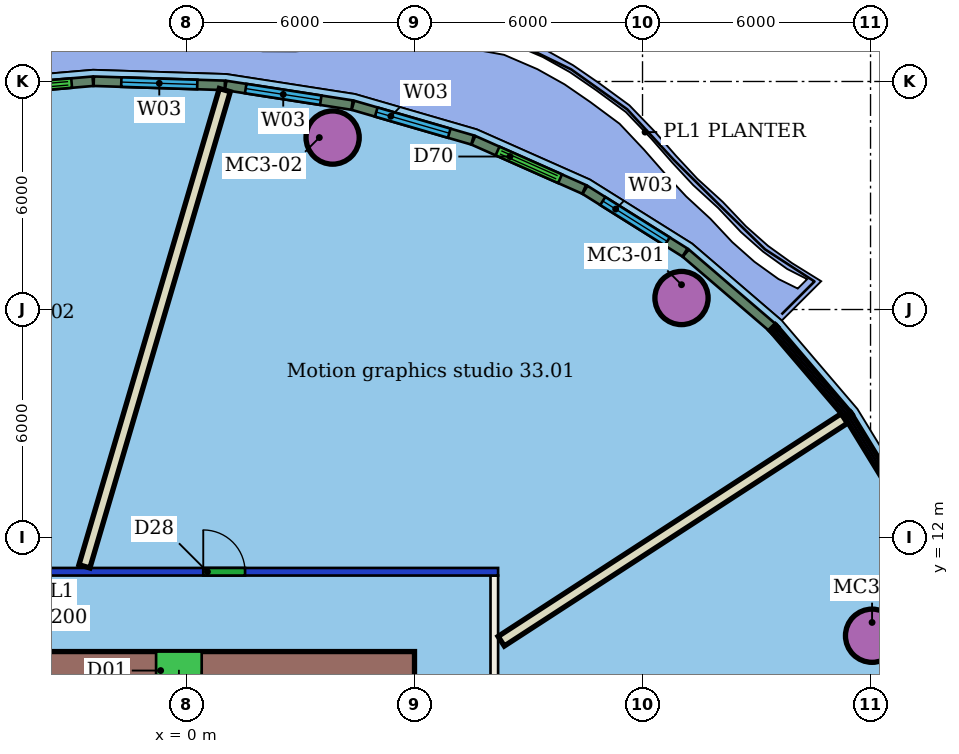
"""IFC4 building model, lengths in metres.
Left out: names, types, materials, properties, quantities, classifications, styles, units other than length and angle.
Written with IfcOpenShell. Run it as: python <this file> out.ifc"""

import sys

from ifc_helpers import new_model, si_unit, direction, frame, frame_2d, origin, origin_2d, place, context, subcontext, project, spatial, rectangle, hollow_circle, extrude, element, fill, save


model = new_model("IFC4")
c1 = context("Model", 3, precision=1e-05, world=origin(), true_north=direction((0.0, 1.0)))
c2 = subcontext(c1, "Body", "Model", "MODEL_VIEW")
j1 = project(units=[si_unit("LENGTHUNIT", "METRE"), si_unit("PLANEANGLEUNIT", "RADIAN")], contexts=[c1])
p1 = place(None, origin())
s1 = spatial("IfcSite", under=j1, at=p1, CompositionType="ELEMENT")
p2 = place(p1, origin())
s2 = spatial("IfcBuilding", under=s1, at=p2, CompositionType="ELEMENT")
p3 = place(p2, frame((0.0, 0.0, 143.4)))
s3 = spatial("IfcBuildingStorey", under=s2, at=p3, CompositionType="ELEMENT", Elevation=143.4)
for number, where, z_axis, x_axis in (
    (1, (13.026, 18.303, 0.0), (0.0, 0.0, 1.0), (1.0, 0.0, 0.0)),
    (2, (3.845, 22.524, 0.0), (0.0, 0.0, 1.0), (1.0, 0.0, 0.0)),
    (3, (18.041, 9.417, 0.0), (0.0, 0.0, 1.0), (1.0, 0.0, 0.0)),
):
    element("IfcColumn", number, at=place(p3, frame(where, z_axis=z_axis, x_axis=x_axis)), inside=s3, PredefinedType="COLUMN", context=c2, shape_type="SweptSolid", body=[
        extrude(hollow_circle(Radius=0.7, WallThickness=0.05, at=origin_2d()), origin(), (0.0, 0.0, 1.0), 3.45),
    ])
p4 = place(p3, frame((-20.2, 11.1, 0.0), z_axis=(0.0, 0.0, 1.0), x_axis=(1.0, 0.0, 0.0)))
e4 = element("IfcWall", 4, at=p4, inside=s3, PredefinedType="PARTITIONING", context=c2, shape_type="SweptSolid", body=[
    extrude(rectangle(XDim=28.4, YDim=0.2, at=frame_2d((14.2, 0.0))), origin(), (0.0, 0.0, 1.0), 3.05),
])
p5 = place(p4, frame((20.641, 0.0, 0.0)))
e5 = element("IfcOpeningElement", 5, at=p5, cuts=e4, PredefinedType="OPENING", context=c2, shape_type="SweptSolid", body=[
    extrude(rectangle(XDim=1.1, YDim=2.1, at=frame_2d((0.55, 1.05))), frame((0.0, 0.11, 0.0), z_axis=(0.0, -1.0, 0.0), x_axis=(1.0, 0.0, 0.0)), (0.0, 0.0, 1.0), 0.22),
])
p6 = place(p4, frame((12.589, 0.0, 0.0)))
e6 = element("IfcOpeningElement", 6, at=p6, cuts=e4, PredefinedType="OPENING", context=c2, shape_type="SweptSolid", body=[
    extrude(rectangle(XDim=1.0, YDim=2.1, at=frame_2d((0.5, 1.05))), frame((0.0, 0.11, 0.0), z_axis=(0.0, -1.0, 0.0), x_axis=(1.0, 0.0, 0.0)), (0.0, 0.0, 1.0), 0.22),
])
p7 = place(p4, frame((8.211, 0.0, 0.0)))
e7 = element("IfcOpeningElement", 7, at=p7, cuts=e4, PredefinedType="OPENING", context=c2, shape_type="SweptSolid", body=[
    extrude(rectangle(XDim=1.2, YDim=2.1, at=frame_2d((0.6, 1.05))), frame((0.0, 0.11, 0.0), z_axis=(0.0, -1.0, 0.0), x_axis=(1.0, 0.0, 0.0)), (0.0, 0.0, 1.0), 0.22),
])
p8 = place(p4, frame((3.191, 0.0, 0.0)))
e8 = element("IfcOpeningElement", 8, at=p8, cuts=e4, PredefinedType="OPENING", context=c2, shape_type="SweptSolid", body=[
    extrude(rectangle(XDim=1.2, YDim=2.1, at=frame_2d((0.6, 1.05))), frame((0.0, 0.11, 0.0), z_axis=(0.0, -1.0, 0.0), x_axis=(1.0, 0.0, 0.0)), (0.0, 0.0, 1.0), 0.22),
])
p9 = place(p3, frame((8.1, 11.0, 0.0), z_axis=(0.0, 0.0, 1.0), x_axis=(0.0, -1.0, 0.0)))
e9 = element("IfcWall", 9, at=p9, inside=s3, PredefinedType="PARTITIONING", context=c2, shape_type="SweptSolid", body=[
    extrude(rectangle(XDim=22.0, YDim=0.2, at=frame_2d((11.0, 0.0))), origin(), (0.0, 0.0, 1.0), 3.45),
])
p10 = place(p9, frame((16.361, 0.0, 0.0)))
e10 = element("IfcOpeningElement", 10, at=p10, cuts=e9, PredefinedType="OPENING", context=c2, shape_type="SweptSolid", body=[
    extrude(rectangle(XDim=1.2, YDim=2.1, at=frame_2d((0.6, 1.05))), frame((0.0, 0.11, 0.0), z_axis=(0.0, -1.0, 0.0), x_axis=(1.0, 0.0, 0.0)), (0.0, 0.0, 1.0), 0.22),
])
p11 = place(p9, frame((8.935, 0.0, 0.0)))
e11 = element("IfcOpeningElement", 11, at=p11, cuts=e9, PredefinedType="OPENING", context=c2, shape_type="SweptSolid", body=[
    extrude(rectangle(XDim=1.8, YDim=2.1, at=frame_2d((0.9, 1.05))), frame((0.0, 0.11, 0.0), z_axis=(0.0, -1.0, 0.0), x_axis=(1.0, 0.0, 0.0)), (0.0, 0.0, 1.0), 0.22),
])
p12 = place(p3, frame((17.311, 15.133, 0.0), z_axis=(0.0, 0.0, 1.0), x_axis=(-0.838747133414, -0.544521116385, 0.0)))
e12 = element("IfcWall", 12, at=p12, inside=s3, PredefinedType="PARTITIONING", context=c2, shape_type="SweptSolid", body=[
    extrude(rectangle(XDim=10.765, YDim=0.3, at=frame_2d((5.382, 0.0))), origin(), (0.0, 0.0, 1.0), 3.45),
])
p13 = place(p3, frame((1.008, 23.773, 0.0), z_axis=(0.0, 0.0, 1.0), x_axis=(-0.282780437721, -0.959184666288, 0.0)))
e13 = element("IfcWall", 13, at=p13, inside=s3, PredefinedType="PARTITIONING", context=c2, shape_type="SweptSolid", body=[
    extrude(rectangle(XDim=13.063, YDim=0.3, at=frame_2d((6.532, 0.0))), origin(), (0.0, 0.0, 1.0), 3.45),
])
p14 = place(p3, frame((15.411, 17.534, 0.0), z_axis=(0.0, 0.0, 1.0), x_axis=(-0.75908968864, 0.650986055611, 0.0)))
e14 = element("IfcWall", 14, at=p14, inside=s3, PredefinedType="SOLIDWALL", context=c2, shape_type="SweptSolid", body=[
    extrude(rectangle(XDim=2.995, YDim=0.25, at=frame_2d((1.497, 0.0))), origin(), (0.0, 0.0, 1.0), 3.1),
])
p15 = place(p3, frame((13.117, 19.499, 0.0), z_axis=(0.0, 0.0, 1.0), x_axis=(-0.847326168921, 0.531072841954, 0.0)))
e15 = element("IfcWall", 15, at=p15, inside=s3, PredefinedType="SOLIDWALL", context=c2, shape_type="SweptSolid", body=[
    extrude(rectangle(XDim=3.105, YDim=0.25, at=frame_2d((1.552, 0.0))), origin(), (0.0, 0.0, 1.0), 3.1),
])
p16 = place(p15, frame((0.552, 0.0, 0.9)))
e16 = element("IfcOpeningElement", 16, at=p16, cuts=e15, PredefinedType="OPENING", context=c2, shape_type="SweptSolid", body=[
    extrude(rectangle(XDim=2.0, YDim=2.1, at=frame_2d((1.0, 1.05))), frame((0.0, 0.135, 0.0), z_axis=(0.0, -1.0, 0.0), x_axis=(1.0, 0.0, 0.0)), (0.0, 0.0, 1.0), 0.27),
])
p17 = place(p3, frame((10.463, 21.16, 0.0), z_axis=(0.0, 0.0, 1.0), x_axis=(-0.91407040375, 0.405555541188, 0.0)))
e17 = element("IfcWall", 17, at=p17, inside=s3, PredefinedType="SOLIDWALL", context=c2, shape_type="SweptSolid", body=[
    extrude(rectangle(XDim=3.187, YDim=0.25, at=frame_2d((1.594, 0.0))), origin(), (0.0, 0.0, 1.0), 3.1),
])
p18 = place(p17, frame((0.693, 0.0, 0.0)))
e18 = element("IfcOpeningElement", 18, at=p18, cuts=e17, PredefinedType="OPENING", context=c2, shape_type="SweptSolid", body=[
    extrude(rectangle(XDim=1.8, YDim=2.4, at=frame_2d((0.9, 1.2))), frame((0.0, 0.135, 0.0), z_axis=(0.0, -1.0, 0.0), x_axis=(1.0, 0.0, 0.0)), (0.0, 0.0, 1.0), 0.27),
])
p19 = place(p3, frame((7.527, 22.461, 0.0), z_axis=(0.0, 0.0, 1.0), x_axis=(-0.960393845313, 0.278646123041, 0.0)))
e19 = element("IfcWall", 19, at=p19, inside=s3, PredefinedType="SOLIDWALL", context=c2, shape_type="SweptSolid", body=[
    extrude(rectangle(XDim=3.276, YDim=0.25, at=frame_2d((1.638, 0.0))), origin(), (0.0, 0.0, 1.0), 3.1),
])
p20 = place(p19, frame((0.638, 0.0, 0.9)))
e20 = element("IfcOpeningElement", 20, at=p20, cuts=e19, PredefinedType="OPENING", context=c2, shape_type="SweptSolid", body=[
    extrude(rectangle(XDim=2.0, YDim=2.1, at=frame_2d((1.0, 1.05))), frame((0.0, 0.135, 0.0), z_axis=(0.0, -1.0, 0.0), x_axis=(1.0, 0.0, 0.0)), (0.0, 0.0, 1.0), 0.27),
])
p21 = place(p3, frame((4.357, 23.379, 0.0), z_axis=(0.0, 0.0, 1.0), x_axis=(-0.988171249995, 0.153354428314, 0.0)))
e21 = element("IfcWall", 21, at=p21, inside=s3, PredefinedType="SOLIDWALL", context=c2, shape_type="SweptSolid", body=[
    extrude(rectangle(XDim=3.365, YDim=0.25, at=frame_2d((1.683, 0.0))), origin(), (0.0, 0.0, 1.0), 3.1),
])
p22 = place(p21, frame((0.833, 0.0, 0.9)))
e22 = element("IfcOpeningElement", 22, at=p22, cuts=e21, PredefinedType="OPENING", context=c2, shape_type="SweptSolid", body=[
    extrude(rectangle(XDim=2.0, YDim=2.1, at=frame_2d((1.0, 1.05))), frame((0.0, 0.135, 0.0), z_axis=(0.0, -1.0, 0.0), x_axis=(1.0, 0.0, 0.0)), (0.0, 0.0, 1.0), 0.27),
])
p23 = place(p3, frame((1.008, 23.897, 0.0), z_axis=(0.0, 0.0, 1.0), x_axis=(-0.999495013577, 0.031776057572, 0.0)))
e23 = element("IfcWall", 23, at=p23, inside=s3, PredefinedType="SOLIDWALL", context=c2, shape_type="SweptSolid", body=[
    extrude(rectangle(XDim=3.45, YDim=0.25, at=frame_2d((1.725, 0.0))), origin(), (0.0, 0.0, 1.0), 3.1),
])
p24 = place(p23, frame((0.725, 0.0, 0.9)))
e24 = element("IfcOpeningElement", 24, at=p24, cuts=e23, PredefinedType="OPENING", context=c2, shape_type="SweptSolid", body=[
    extrude(rectangle(XDim=2.0, YDim=2.1, at=frame_2d((1.0, 1.05))), frame((0.0, 0.135, 0.0), z_axis=(0.0, -1.0, 0.0), x_axis=(1.0, 0.0, 0.0)), (0.0, 0.0, 1.0), 0.27),
])
p25 = place(p3, frame((-2.463, 24.007, 0.0), z_axis=(0.0, 0.0, 1.0), x_axis=(-0.996379423163, -0.085017910447, 0.0)))
e25 = element("IfcWall", 25, at=p25, inside=s3, PredefinedType="SOLIDWALL", context=c2, shape_type="SweptSolid", body=[
    extrude(rectangle(XDim=3.523, YDim=0.25, at=frame_2d((1.762, 0.0))), origin(), (0.0, 0.0, 1.0), 3.1),
])
p26 = place(p25, frame((0.562, 0.0, 0.0)))
e26 = element("IfcOpeningElement", 26, at=p26, cuts=e25, PredefinedType="OPENING", context=c2, shape_type="SweptSolid", body=[
    extrude(rectangle(XDim=1.8, YDim=2.4, at=frame_2d((0.9, 1.2))), frame((0.0, 0.135, 0.0), z_axis=(0.0, -1.0, 0.0), x_axis=(1.0, 0.0, 0.0)), (0.0, 0.0, 1.0), 0.27),
])
p27 = place(p3, frame((6.0, 8.5, 0.0), z_axis=(0.0, 0.0, 1.0), x_axis=(-1.0, 0.0, 0.0)))
e27 = element("IfcWall", 27, at=p27, inside=s3, PredefinedType="SHEAR", context=c2, shape_type="SweptSolid", body=[
    extrude(rectangle(XDim=12.0, YDim=1.0, at=frame_2d((6.0, 0.0))), origin(), (0.0, 0.0, 1.0), 3.3),
])
p28 = place(p27, frame((5.6, 0.0, 0.0)))
e28 = element("IfcOpeningElement", 28, at=p28, cuts=e27, PredefinedType="OPENING", context=c2, shape_type="SweptSolid", body=[
    extrude(rectangle(XDim=1.2, YDim=2.1, at=frame_2d((0.6, 1.05))), frame((0.0, 0.51, 0.0), z_axis=(0.0, -1.0, 0.0), x_axis=(1.0, 0.0, 0.0)), (0.0, 0.0, 1.0), 1.02),
])
p29 = place(p5, origin())
e29 = element("IfcDoor", 29, at=p29, inside=s3, OperationType="SINGLE_SWING_LEFT", PredefinedType="DOOR", context=c2, shape_type="SweptSolid", body=[
    extrude(rectangle(XDim=1.1, YDim=2.1, at=frame_2d((0.55, 1.05))), frame((0.0, 0.025, 0.0), z_axis=(0.0, -1.0, 0.0), x_axis=(1.0, 0.0, 0.0)), (0.0, 0.0, 1.0), 0.05),
])
fill(e5, e29)
p30 = place(p16, origin())
e30 = element("IfcWindow", 30, at=p30, inside=s3, PartitioningType="SINGLE_PANEL", PredefinedType="WINDOW", context=c2, shape_type="SweptSolid", body=[
    extrude(rectangle(XDim=2.0, YDim=2.1, at=frame_2d((1.0, 1.05))), frame((0.0, 0.03, 0.0), z_axis=(0.0, -1.0, 0.0), x_axis=(1.0, 0.0, 0.0)), (0.0, 0.0, 1.0), 0.06),
])
fill(e16, e30)
p31 = place(p18, origin())
e31 = element("IfcDoor", 31, at=p31, inside=s3, OperationType="DOUBLE_DOOR_SLIDING", PredefinedType="DOOR", context=c2, shape_type="SweptSolid", body=[
    extrude(rectangle(XDim=1.8, YDim=2.4, at=frame_2d((0.9, 1.2))), frame((0.0, 0.025, 0.0), z_axis=(0.0, -1.0, 0.0), x_axis=(1.0, 0.0, 0.0)), (0.0, 0.0, 1.0), 0.05),
])
fill(e18, e31)
p32 = place(p20, origin())
e32 = element("IfcWindow", 32, at=p32, inside=s3, PartitioningType="SINGLE_PANEL", PredefinedType="WINDOW", context=c2, shape_type="SweptSolid", body=[
    extrude(rectangle(XDim=2.0, YDim=2.1, at=frame_2d((1.0, 1.05))), frame((0.0, 0.03, 0.0), z_axis=(0.0, -1.0, 0.0), x_axis=(1.0, 0.0, 0.0)), (0.0, 0.0, 1.0), 0.06),
])
fill(e20, e32)
p33 = place(p22, origin())
e33 = element("IfcWindow", 33, at=p33, inside=s3, PartitioningType="SINGLE_PANEL", PredefinedType="WINDOW", context=c2, shape_type="SweptSolid", body=[
    extrude(rectangle(XDim=2.0, YDim=2.1, at=frame_2d((1.0, 1.05))), frame((0.0, 0.03, 0.0), z_axis=(0.0, -1.0, 0.0), x_axis=(1.0, 0.0, 0.0)), (0.0, 0.0, 1.0), 0.06),
])
fill(e22, e33)
p34 = place(p24, origin())
e34 = element("IfcWindow", 34, at=p34, inside=s3, PartitioningType="SINGLE_PANEL", PredefinedType="WINDOW", context=c2, shape_type="SweptSolid", body=[
    extrude(rectangle(XDim=2.0, YDim=2.1, at=frame_2d((1.0, 1.05))), frame((0.0, 0.03, 0.0), z_axis=(0.0, -1.0, 0.0), x_axis=(1.0, 0.0, 0.0)), (0.0, 0.0, 1.0), 0.06),
])
fill(e24, e34)
p35 = place(p26, origin())
e35 = element("IfcDoor", 35, at=p35, inside=s3, OperationType="DOUBLE_DOOR_SLIDING", PredefinedType="DOOR", context=c2, shape_type="SweptSolid", body=[
    extrude(rectangle(XDim=1.8, YDim=2.4, at=frame_2d((0.9, 1.2))), frame((0.0, 0.025, 0.0), z_axis=(0.0, -1.0, 0.0), x_axis=(1.0, 0.0, 0.0)), (0.0, 0.0, 1.0), 0.05),
])
fill(e26, e35)
p36 = place(p28, origin())
e36 = element("IfcDoor", 36, at=p36, inside=s3, OperationType="DOUBLE_DOOR_SINGLE_SWING", PredefinedType="NOTDEFINED", context=c2, shape_type="SweptSolid", body=[
    extrude(rectangle(XDim=1.2, YDim=2.1, at=frame_2d((0.6, 1.05))), frame((0.0, 0.025, 0.0), z_axis=(0.0, -1.0, 0.0), x_axis=(1.0, 0.0, 0.0)), (0.0, 0.0, 1.0), 0.05),
])
fill(e28, e36)
save(model, sys.argv[1])
